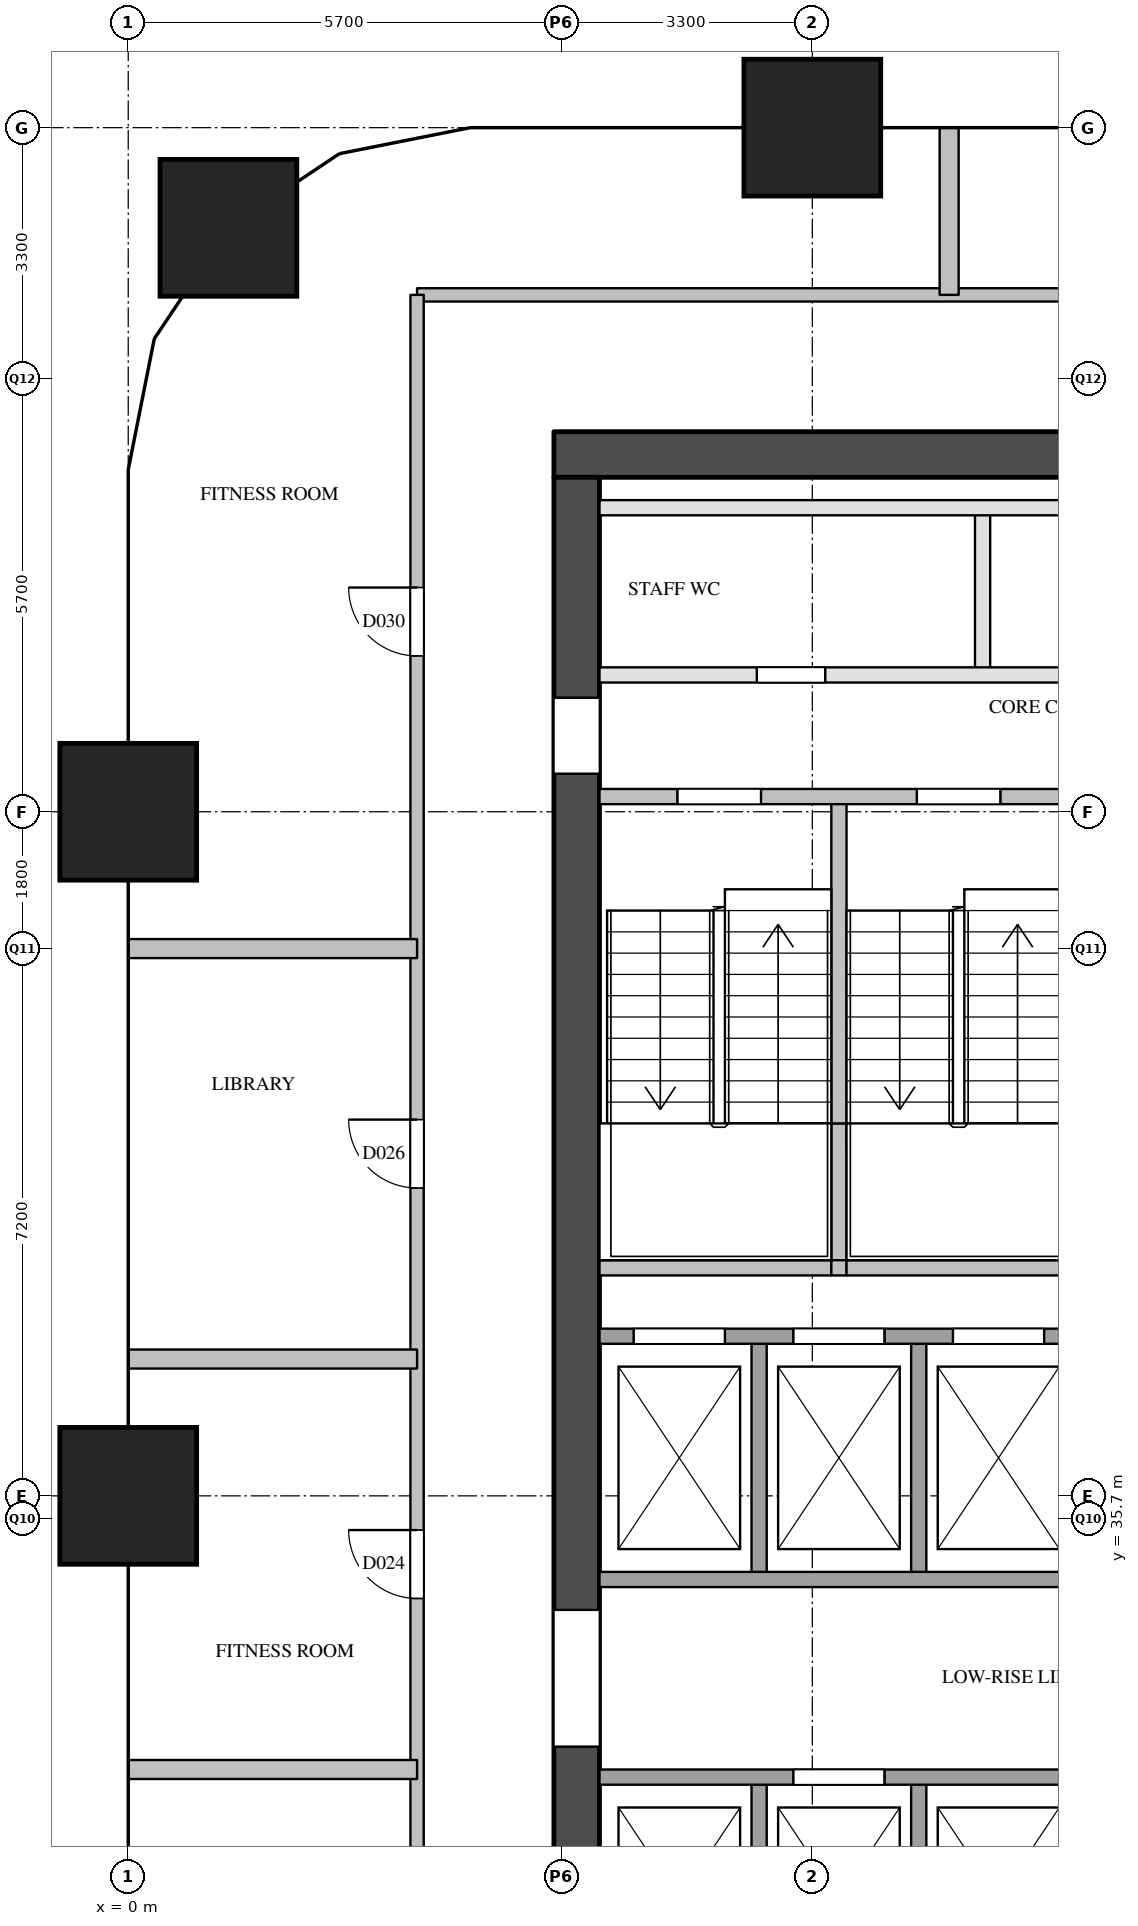
"""IFC4 building model, lengths in metres.
Left out: names, types, materials, properties, quantities, classifications, styles, units other than length and angle.
Written with IfcOpenShell. Run it as: python <this file> out.ifc"""

import sys

from ifc_helpers import new_model, si_unit, direction, frame, frame_2d, origin, origin_2d, place, context, subcontext, project, spatial, rectangle, extrude, element, fill, save


model = new_model("IFC4")
c1 = context("Model", 3, precision=1e-05, world=origin(), true_north=direction((0.0, 1.0)))
c2 = subcontext(c1, "Body", "Model", "MODEL_VIEW")
j1 = project(units=[si_unit("LENGTHUNIT", "METRE"), si_unit("PLANEANGLEUNIT", "RADIAN")], contexts=[c1])
p1 = place(None, origin())
s1 = spatial("IfcSite", under=j1, at=p1, CompositionType="ELEMENT")
p2 = place(p1, origin())
s2 = spatial("IfcBuilding", under=s1, at=p2, CompositionType="ELEMENT")
p3 = place(p2, frame((0.0, 0.0, 31.0)))
s3 = spatial("IfcBuildingStorey", under=s2, at=p3, CompositionType="ELEMENT", Elevation=31.0)
for number, where, z_axis, x_axis in (
    (1, (0.0, 36.0, 0.0), (0.0, 0.0, 1.0), (1.0, 0.0, 0.0)),
    (2, (0.0, 45.0, 0.0), (0.0, 0.0, 1.0), (1.0, 0.0, 0.0)),
    (3, (1.318, 52.682, 0.0), (0.0, 0.0, 1.0), (1.0, 0.0, 0.0)),
    (4, (9.0, 54.0, 0.0), (0.0, 0.0, 1.0), (1.0, 0.0, 0.0)),
):
    element("IfcColumn", number, at=place(p3, frame(where, z_axis=z_axis, x_axis=x_axis)), inside=s3, PredefinedType="COLUMN", context=c2, shape_type="SweptSolid", body=[
        extrude(rectangle(XDim=1.8, YDim=1.8, at=origin_2d()), origin(), (0.0, 0.0, 1.0), 3.8),
    ])
p4 = place(p3, frame((5.6, 49.7, 0.0), z_axis=(0.0, 0.0, 1.0), x_axis=(1.0, 0.0, 0.0)))
e5 = element("IfcWall", 5, at=p4, inside=s3, PredefinedType="SHEAR", context=c2, shape_type="SweptSolid", body=[
    extrude(rectangle(XDim=12.4, YDim=0.6, at=frame_2d((6.2, 0.0))), origin(), (0.0, 0.0, 1.0), 3.5),
])
p5 = place(p3, frame((5.9, 29.1, 0.0), z_axis=(0.0, 0.0, 1.0), x_axis=(0.0, 1.0, 0.0)))
e6 = element("IfcWall", 6, at=p5, inside=s3, PredefinedType="SHEAR", context=c2, shape_type="SweptSolid", body=[
    extrude(rectangle(XDim=20.3, YDim=0.6, at=frame_2d((10.15, 0.0))), origin(), (0.0, 0.0, 1.0), 3.5),
])
p6 = place(p5, frame((3.6, 0.0, 0.0)))
e7 = element("IfcOpeningElement", 7, at=p6, cuts=e6, PredefinedType="OPENING", context=c2, shape_type="SweptSolid", body=[
    extrude(rectangle(XDim=1.8, YDim=2.1, at=frame_2d((0.9, 1.05))), frame((0.0, 0.31, 0.0), z_axis=(0.0, -1.0, 0.0), x_axis=(1.0, 0.0, 0.0)), (0.0, 0.0, 1.0), 0.62),
])
p7 = place(p5, frame((16.4, 0.0, 0.0)))
e8 = element("IfcOpeningElement", 8, at=p7, cuts=e6, PredefinedType="OPENING", context=c2, shape_type="SweptSolid", body=[
    extrude(rectangle(XDim=1.0, YDim=2.1, at=frame_2d((0.5, 1.05))), frame((0.0, 0.31, 0.0), z_axis=(0.0, -1.0, 0.0), x_axis=(1.0, 0.0, 0.0)), (0.0, 0.0, 1.0), 0.62),
])
p8 = place(p3, frame((8.3, 29.1, 0.0), z_axis=(0.0, 0.0, 1.0), x_axis=(0.0, 1.0, 0.0)))
e9 = element("IfcWall", 9, at=p8, inside=s3, PredefinedType="SOLIDWALL", context=c2, shape_type="SweptSolid", body=[
    extrude(rectangle(XDim=3.2, YDim=0.2, at=frame_2d((1.6, 0.0))), origin(), (0.0, 0.0, 1.0), 3.5),
])
p9 = place(p3, frame((8.3, 34.9, 0.0), z_axis=(0.0, 0.0, 1.0), x_axis=(0.0, 1.0, 0.0)))
e10 = element("IfcWall", 10, at=p9, inside=s3, PredefinedType="SOLIDWALL", context=c2, shape_type="SweptSolid", body=[
    extrude(rectangle(XDim=3.2, YDim=0.2, at=frame_2d((1.6, 0.0))), origin(), (0.0, 0.0, 1.0), 3.5),
])
p10 = place(p3, frame((9.35, 39.0, 0.0), z_axis=(0.0, 0.0, 1.0), x_axis=(0.0, 1.0, 0.0)))
e11 = element("IfcWall", 11, at=p10, inside=s3, PredefinedType="SOLIDWALL", context=c2, shape_type="SweptSolid", body=[
    extrude(rectangle(XDim=1.9, YDim=0.2, at=frame_2d((0.95, 0.0))), origin(), (0.0, 0.0, 1.0), 3.5),
])
p11 = place(p3, frame((9.35, 40.9, 0.0), z_axis=(0.0, 0.0, 1.0), x_axis=(0.0, 1.0, 0.0)))
e12 = element("IfcWall", 12, at=p11, inside=s3, PredefinedType="SOLIDWALL", context=c2, shape_type="SweptSolid", body=[
    extrude(rectangle(XDim=4.3, YDim=0.2, at=frame_2d((2.15, 0.0))), origin(), (0.0, 0.0, 1.0), 3.5),
])
p12 = place(p3, frame((10.4, 29.1, 0.0), z_axis=(0.0, 0.0, 1.0), x_axis=(0.0, 1.0, 0.0)))
e13 = element("IfcWall", 13, at=p12, inside=s3, PredefinedType="SOLIDWALL", context=c2, shape_type="SweptSolid", body=[
    extrude(rectangle(XDim=3.2, YDim=0.2, at=frame_2d((1.6, 0.0))), origin(), (0.0, 0.0, 1.0), 3.5),
])
p13 = place(p3, frame((10.4, 34.9, 0.0), z_axis=(0.0, 0.0, 1.0), x_axis=(0.0, 1.0, 0.0)))
e14 = element("IfcWall", 14, at=p13, inside=s3, PredefinedType="SOLIDWALL", context=c2, shape_type="SweptSolid", body=[
    extrude(rectangle(XDim=3.2, YDim=0.2, at=frame_2d((1.6, 0.0))), origin(), (0.0, 0.0, 1.0), 3.5),
])
p14 = place(p3, frame((11.24, 46.8, 0.0), z_axis=(0.0, 0.0, 1.0), x_axis=(0.0, 1.0, 0.0)))
e15 = element("IfcWall", 15, at=p14, inside=s3, PredefinedType="PARTITIONING", context=c2, shape_type="SweptSolid", body=[
    extrude(rectangle(XDim=2.2, YDim=0.2, at=frame_2d((1.1, 0.0))), origin(), (0.0, 0.0, 1.0), 3.5),
])
p15 = place(p3, frame((6.2, 32.3, 0.0), z_axis=(0.0, 0.0, 1.0), x_axis=(1.0, 0.0, 0.0)))
e16 = element("IfcWall", 16, at=p15, inside=s3, PredefinedType="SOLIDWALL", context=c2, shape_type="SweptSolid", body=[
    extrude(rectangle(XDim=11.2, YDim=0.2, at=frame_2d((5.6, 0.0))), origin(), (0.0, 0.0, 1.0), 3.5),
])
p16 = place(p15, frame((2.55, 0.0, 0.0)))
e17 = element("IfcOpeningElement", 17, at=p16, cuts=e16, PredefinedType="OPENING", context=c2, shape_type="SweptSolid", body=[
    extrude(rectangle(XDim=1.2, YDim=2.1, at=frame_2d((0.6, 1.05))), frame((0.0, 0.11, 0.0), z_axis=(0.0, -1.0, 0.0), x_axis=(1.0, 0.0, 0.0)), (0.0, 0.0, 1.0), 0.22),
])
p17 = place(p3, frame((6.2, 34.9, 0.0), z_axis=(0.0, 0.0, 1.0), x_axis=(1.0, 0.0, 0.0)))
e18 = element("IfcWall", 18, at=p17, inside=s3, PredefinedType="SOLIDWALL", context=c2, shape_type="SweptSolid", body=[
    extrude(rectangle(XDim=11.2, YDim=0.2, at=frame_2d((5.6, 0.0))), origin(), (0.0, 0.0, 1.0), 3.5),
])
p18 = place(p3, frame((6.2, 38.1, 0.0), z_axis=(0.0, 0.0, 1.0), x_axis=(1.0, 0.0, 0.0)))
e19 = element("IfcWall", 19, at=p18, inside=s3, PredefinedType="SOLIDWALL", context=c2, shape_type="SweptSolid", body=[
    extrude(rectangle(XDim=11.2, YDim=0.2, at=frame_2d((5.6, 0.0))), origin(), (0.0, 0.0, 1.0), 3.5),
])
p19 = place(p18, frame((0.45, 0.0, 0.0)))
e20 = element("IfcOpeningElement", 20, at=p19, cuts=e19, PredefinedType="OPENING", context=c2, shape_type="SweptSolid", body=[
    extrude(rectangle(XDim=1.2, YDim=2.1, at=frame_2d((0.6, 1.05))), frame((0.0, 0.11, 0.0), z_axis=(0.0, -1.0, 0.0), x_axis=(1.0, 0.0, 0.0)), (0.0, 0.0, 1.0), 0.22),
])
p20 = place(p18, frame((2.55, 0.0, 0.0)))
e21 = element("IfcOpeningElement", 21, at=p20, cuts=e19, PredefinedType="OPENING", context=c2, shape_type="SweptSolid", body=[
    extrude(rectangle(XDim=1.2, YDim=2.1, at=frame_2d((0.6, 1.05))), frame((0.0, 0.11, 0.0), z_axis=(0.0, -1.0, 0.0), x_axis=(1.0, 0.0, 0.0)), (0.0, 0.0, 1.0), 0.22),
])
p21 = place(p18, frame((4.65, 0.0, 0.0)))
e22 = element("IfcOpeningElement", 22, at=p21, cuts=e19, PredefinedType="OPENING", context=c2, shape_type="SweptSolid", body=[
    extrude(rectangle(XDim=1.2, YDim=2.1, at=frame_2d((0.6, 1.05))), frame((0.0, 0.11, 0.0), z_axis=(0.0, -1.0, 0.0), x_axis=(1.0, 0.0, 0.0)), (0.0, 0.0, 1.0), 0.22),
])
p22 = place(p18, frame((6.75, 0.0, 0.0)))
e23 = element("IfcOpeningElement", 23, at=p22, cuts=e19, PredefinedType="OPENING", context=c2, shape_type="SweptSolid", body=[
    extrude(rectangle(XDim=1.2, YDim=2.1, at=frame_2d((0.6, 1.05))), frame((0.0, 0.11, 0.0), z_axis=(0.0, -1.0, 0.0), x_axis=(1.0, 0.0, 0.0)), (0.0, 0.0, 1.0), 0.22),
])
p23 = place(p3, frame((6.2, 39.0, 0.0), z_axis=(0.0, 0.0, 1.0), x_axis=(1.0, 0.0, 0.0)))
e24 = element("IfcWall", 24, at=p23, inside=s3, PredefinedType="SOLIDWALL", context=c2, shape_type="SweptSolid", body=[
    extrude(rectangle(XDim=3.05, YDim=0.2, at=frame_2d((1.525, 0.0))), origin(), (0.0, 0.0, 1.0), 3.5),
])
p24 = place(p3, frame((9.25, 39.0, 0.0), z_axis=(0.0, 0.0, 1.0), x_axis=(1.0, 0.0, 0.0)))
e25 = element("IfcWall", 25, at=p24, inside=s3, PredefinedType="SOLIDWALL", context=c2, shape_type="SweptSolid", body=[
    extrude(rectangle(XDim=0.2, YDim=0.2, at=frame_2d((0.1, 0.0))), origin(), (0.0, 0.0, 1.0), 3.5),
])
p25 = place(p3, frame((9.45, 39.0, 0.0), z_axis=(0.0, 0.0, 1.0), x_axis=(1.0, 0.0, 0.0)))
e26 = element("IfcWall", 26, at=p25, inside=s3, PredefinedType="SOLIDWALL", context=c2, shape_type="SweptSolid", body=[
    extrude(rectangle(XDim=3.05, YDim=0.2, at=frame_2d((1.525, 0.0))), origin(), (0.0, 0.0, 1.0), 3.5),
])
p26 = place(p3, frame((6.2, 45.2, 0.0), z_axis=(0.0, 0.0, 1.0), x_axis=(1.0, 0.0, 0.0)))
e27 = element("IfcWall", 27, at=p26, inside=s3, PredefinedType="SOLIDWALL", context=c2, shape_type="SweptSolid", body=[
    extrude(rectangle(XDim=6.3, YDim=0.2, at=frame_2d((3.15, 0.0))), origin(), (0.0, 0.0, 1.0), 3.5),
])
p27 = place(p26, frame((1.025, 0.0, 0.0)))
e28 = element("IfcOpeningElement", 28, at=p27, cuts=e27, PredefinedType="OPENING", context=c2, shape_type="SweptSolid", body=[
    extrude(rectangle(XDim=1.1, YDim=2.1, at=frame_2d((0.55, 1.05))), frame((0.0, 0.11, 0.0), z_axis=(0.0, -1.0, 0.0), x_axis=(1.0, 0.0, 0.0)), (0.0, 0.0, 1.0), 0.22),
])
p28 = place(p26, frame((4.175, 0.0, 0.0)))
e29 = element("IfcOpeningElement", 29, at=p28, cuts=e27, PredefinedType="OPENING", context=c2, shape_type="SweptSolid", body=[
    extrude(rectangle(XDim=1.1, YDim=2.1, at=frame_2d((0.55, 1.05))), frame((0.0, 0.11, 0.0), z_axis=(0.0, -1.0, 0.0), x_axis=(1.0, 0.0, 0.0)), (0.0, 0.0, 1.0), 0.22),
])
p29 = place(p3, frame((6.2, 46.8, 0.0), z_axis=(0.0, 0.0, 1.0), x_axis=(1.0, 0.0, 0.0)))
e30 = element("IfcWall", 30, at=p29, inside=s3, PredefinedType="PARTITIONING", context=c2, shape_type="SweptSolid", body=[
    extrude(rectangle(XDim=11.2, YDim=0.2, at=frame_2d((5.6, 0.0))), origin(), (0.0, 0.0, 1.0), 3.5),
])
p30 = place(p29, frame((2.07, 0.0, 0.0)))
e31 = element("IfcOpeningElement", 31, at=p30, cuts=e30, PredefinedType="OPENING", context=c2, shape_type="SweptSolid", body=[
    extrude(rectangle(XDim=0.9, YDim=2.1, at=frame_2d((0.45, 1.05))), frame((0.0, 0.11, 0.0), z_axis=(0.0, -1.0, 0.0), x_axis=(1.0, 0.0, 0.0)), (0.0, 0.0, 1.0), 0.22),
])
p31 = place(p29, frame((7.67, 0.0, 0.0)))
e32 = element("IfcOpeningElement", 32, at=p31, cuts=e30, PredefinedType="OPENING", context=c2, shape_type="SweptSolid", body=[
    extrude(rectangle(XDim=0.9, YDim=2.1, at=frame_2d((0.45, 1.05))), frame((0.0, 0.11, 0.0), z_axis=(0.0, -1.0, 0.0), x_axis=(1.0, 0.0, 0.0)), (0.0, 0.0, 1.0), 0.22),
])
p32 = place(p3, frame((6.2, 49.0, 0.0), z_axis=(0.0, 0.0, 1.0), x_axis=(1.0, 0.0, 0.0)))
e33 = element("IfcWall", 33, at=p32, inside=s3, PredefinedType="PARTITIONING", context=c2, shape_type="SweptSolid", body=[
    extrude(rectangle(XDim=11.2, YDim=0.2, at=frame_2d((5.6, 0.0))), origin(), (0.0, 0.0, 1.0), 3.5),
])
p33 = place(p3, frame((3.8, 51.8, 0.0), z_axis=(0.0, 0.0, 1.0), x_axis=(1.0, 0.0, 0.0)))
e34 = element("IfcWall", 34, at=p33, inside=s3, PredefinedType="PARTITIONING", context=c2, shape_type="SweptSolid", body=[
    extrude(rectangle(XDim=16.0, YDim=0.175, at=frame_2d((8.0, 0.0))), origin(), (0.0, 0.0, 1.0), 3.5),
])
p34 = place(p3, frame((3.8, 26.7, 0.0), z_axis=(0.0, 0.0, 1.0), x_axis=(0.0, 1.0, 0.0)))
e35 = element("IfcWall", 35, at=p34, inside=s3, PredefinedType="PARTITIONING", context=c2, shape_type="SweptSolid", body=[
    extrude(rectangle(XDim=25.1, YDim=0.175, at=frame_2d((12.55, 0.0))), origin(), (0.0, 0.0, 1.0), 2.5),
])
p35 = place(p34, frame((2.4, 0.0, 0.0)))
e36 = element("IfcOpeningElement", 36, at=p35, cuts=e35, PredefinedType="OPENING", context=c2, shape_type="SweptSolid", body=[
    extrude(rectangle(XDim=0.9, YDim=2.1, at=frame_2d((0.45, 1.05))), frame((0.0, 0.097, 0.0), z_axis=(0.0, -1.0, 0.0), x_axis=(1.0, 0.0, 0.0)), (0.0, 0.0, 1.0), 0.195),
])
p36 = place(p34, frame((7.95, 0.0, 0.0)))
e37 = element("IfcOpeningElement", 37, at=p36, cuts=e35, PredefinedType="OPENING", context=c2, shape_type="SweptSolid", body=[
    extrude(rectangle(XDim=0.9, YDim=2.1, at=frame_2d((0.45, 1.05))), frame((0.0, 0.097, 0.0), z_axis=(0.0, -1.0, 0.0), x_axis=(1.0, 0.0, 0.0)), (0.0, 0.0, 1.0), 0.195),
])
p37 = place(p34, frame((13.35, 0.0, 0.0)))
e38 = element("IfcOpeningElement", 38, at=p37, cuts=e35, PredefinedType="OPENING", context=c2, shape_type="SweptSolid", body=[
    extrude(rectangle(XDim=0.9, YDim=2.1, at=frame_2d((0.45, 1.05))), frame((0.0, 0.097, 0.0), z_axis=(0.0, -1.0, 0.0), x_axis=(1.0, 0.0, 0.0)), (0.0, 0.0, 1.0), 0.195),
])
p38 = place(p34, frame((20.35, 0.0, 0.0)))
e39 = element("IfcOpeningElement", 39, at=p38, cuts=e35, PredefinedType="OPENING", context=c2, shape_type="SweptSolid", body=[
    extrude(rectangle(XDim=0.9, YDim=2.1, at=frame_2d((0.45, 1.05))), frame((0.0, 0.097, 0.0), z_axis=(0.0, -1.0, 0.0), x_axis=(1.0, 0.0, 0.0)), (0.0, 0.0, 1.0), 0.195),
])
for number, where, z_axis, x_axis in (
    (40, (0.0, 32.4, 0.0), (0.0, 0.0, 1.0), (1.0, 0.0, 0.0)),
    (41, (0.0, 37.8, 0.0), (0.0, 0.0, 1.0), (1.0, 0.0, 0.0)),
    (42, (0.0, 43.2, 0.0), (0.0, 0.0, 1.0), (1.0, 0.0, 0.0)),
):
    element("IfcWall", number, at=place(p3, frame(where, z_axis=z_axis, x_axis=x_axis)), inside=s3, PredefinedType="PARTITIONING", context=c2, shape_type="SweptSolid", body=[
        extrude(rectangle(XDim=3.8, YDim=0.25, at=frame_2d((1.9, 0.0))), origin(), (0.0, 0.0, 1.0), 2.5),
    ])
p39 = place(p3, frame((10.8, 51.8, 0.0), z_axis=(0.0, 0.0, 1.0), x_axis=(0.0, 1.0, 0.0)))
e43 = element("IfcWall", 43, at=p39, inside=s3, PredefinedType="PARTITIONING", context=c2, shape_type="SweptSolid", body=[
    extrude(rectangle(XDim=2.2, YDim=0.25, at=frame_2d((1.1, 0.0))), origin(), (0.0, 0.0, 1.0), 2.5),
])
p40 = place(p16, origin())
e44 = element("IfcDoor", 44, at=p40, inside=s3, OperationType="SLIDING_TO_LEFT", PredefinedType="DOOR", context=c2, shape_type="SweptSolid", body=[
    extrude(rectangle(XDim=1.2, YDim=2.1, at=frame_2d((0.6, 1.05))), frame((0.0, 0.025, 0.0), z_axis=(0.0, -1.0, 0.0), x_axis=(1.0, 0.0, 0.0)), (0.0, 0.0, 1.0), 0.05),
])
fill(e17, e44)
p41 = place(p19, origin())
e45 = element("IfcDoor", 45, at=p41, inside=s3, OperationType="SLIDING_TO_LEFT", PredefinedType="DOOR", context=c2, shape_type="SweptSolid", body=[
    extrude(rectangle(XDim=1.2, YDim=2.1, at=frame_2d((0.6, 1.05))), frame((0.0, 0.025, 0.0), z_axis=(0.0, -1.0, 0.0), x_axis=(1.0, 0.0, 0.0)), (0.0, 0.0, 1.0), 0.05),
])
fill(e20, e45)
p42 = place(p20, origin())
e46 = element("IfcDoor", 46, at=p42, inside=s3, OperationType="SLIDING_TO_LEFT", PredefinedType="DOOR", context=c2, shape_type="SweptSolid", body=[
    extrude(rectangle(XDim=1.2, YDim=2.1, at=frame_2d((0.6, 1.05))), frame((0.0, 0.025, 0.0), z_axis=(0.0, -1.0, 0.0), x_axis=(1.0, 0.0, 0.0)), (0.0, 0.0, 1.0), 0.05),
])
fill(e21, e46)
p43 = place(p21, origin())
e47 = element("IfcDoor", 47, at=p43, inside=s3, OperationType="SLIDING_TO_LEFT", PredefinedType="DOOR", context=c2, shape_type="SweptSolid", body=[
    extrude(rectangle(XDim=1.2, YDim=2.1, at=frame_2d((0.6, 1.05))), frame((0.0, 0.025, 0.0), z_axis=(0.0, -1.0, 0.0), x_axis=(1.0, 0.0, 0.0)), (0.0, 0.0, 1.0), 0.05),
])
fill(e22, e47)
p44 = place(p6, origin())
e48 = element("IfcDoor", 48, at=p44, inside=s3, OperationType="DOUBLE_DOOR_SINGLE_SWING", PredefinedType="DOOR", context=c2, shape_type="SweptSolid", body=[
    extrude(rectangle(XDim=1.8, YDim=2.1, at=frame_2d((0.9, 1.05))), frame((0.0, 0.025, 0.0), z_axis=(0.0, -1.0, 0.0), x_axis=(1.0, 0.0, 0.0)), (0.0, 0.0, 1.0), 0.05),
])
fill(e7, e48)
p45 = place(p27, origin())
e49 = element("IfcDoor", 49, at=p45, inside=s3, OperationType="SINGLE_SWING_LEFT", PredefinedType="DOOR", context=c2, shape_type="SweptSolid", body=[
    extrude(rectangle(XDim=1.1, YDim=2.1, at=frame_2d((0.55, 1.05))), frame((0.0, 0.025, 0.0), z_axis=(0.0, -1.0, 0.0), x_axis=(1.0, 0.0, 0.0)), (0.0, 0.0, 1.0), 0.05),
])
fill(e28, e49)
p46 = place(p28, origin())
e50 = element("IfcDoor", 50, at=p46, inside=s3, OperationType="SINGLE_SWING_RIGHT", PredefinedType="DOOR", context=c2, shape_type="SweptSolid", body=[
    extrude(rectangle(XDim=1.1, YDim=2.1, at=frame_2d((0.55, 1.05))), frame((0.0, 0.025, 0.0), z_axis=(0.0, -1.0, 0.0), x_axis=(1.0, 0.0, 0.0)), (0.0, 0.0, 1.0), 0.05),
])
fill(e29, e50)
p47 = place(p7, origin())
e51 = element("IfcDoor", 51, at=p47, inside=s3, OperationType="SINGLE_SWING_RIGHT", PredefinedType="DOOR", context=c2, shape_type="SweptSolid", body=[
    extrude(rectangle(XDim=1.0, YDim=2.1, at=frame_2d((0.5, 1.05))), frame((0.0, 0.025, 0.0), z_axis=(0.0, -1.0, 0.0), x_axis=(1.0, 0.0, 0.0)), (0.0, 0.0, 1.0), 0.05),
])
fill(e8, e51)
p48 = place(p30, origin())
e52 = element("IfcDoor", 52, at=p48, inside=s3, OperationType="SINGLE_SWING_LEFT", PredefinedType="DOOR", context=c2, shape_type="SweptSolid", body=[
    extrude(rectangle(XDim=0.9, YDim=2.1, at=frame_2d((0.45, 1.05))), frame((0.0, 0.025, 0.0), z_axis=(0.0, -1.0, 0.0), x_axis=(1.0, 0.0, 0.0)), (0.0, 0.0, 1.0), 0.05),
])
fill(e31, e52)
p49 = place(p36, origin())
e53 = element("IfcDoor", 53, at=p49, inside=s3, OperationType="SINGLE_SWING_RIGHT", PredefinedType="DOOR", context=c2, shape_type="SweptSolid", body=[
    extrude(rectangle(XDim=0.9, YDim=2.1, at=frame_2d((0.45, 1.05))), frame((0.0, 0.025, 0.0), z_axis=(0.0, -1.0, 0.0), x_axis=(1.0, 0.0, 0.0)), (0.0, 0.0, 1.0), 0.05),
])
fill(e37, e53)
p50 = place(p37, origin())
e54 = element("IfcDoor", 54, at=p50, inside=s3, OperationType="SINGLE_SWING_RIGHT", PredefinedType="DOOR", context=c2, shape_type="SweptSolid", body=[
    extrude(rectangle(XDim=0.9, YDim=2.1, at=frame_2d((0.45, 1.05))), frame((0.0, 0.025, 0.0), z_axis=(0.0, -1.0, 0.0), x_axis=(1.0, 0.0, 0.0)), (0.0, 0.0, 1.0), 0.05),
])
fill(e38, e54)
p51 = place(p38, origin())
e55 = element("IfcDoor", 55, at=p51, inside=s3, OperationType="SINGLE_SWING_RIGHT", PredefinedType="DOOR", context=c2, shape_type="SweptSolid", body=[
    extrude(rectangle(XDim=0.9, YDim=2.1, at=frame_2d((0.45, 1.05))), frame((0.0, 0.025, 0.0), z_axis=(0.0, -1.0, 0.0), x_axis=(1.0, 0.0, 0.0)), (0.0, 0.0, 1.0), 0.05),
])
fill(e39, e55)
save(model, sys.argv[1])
